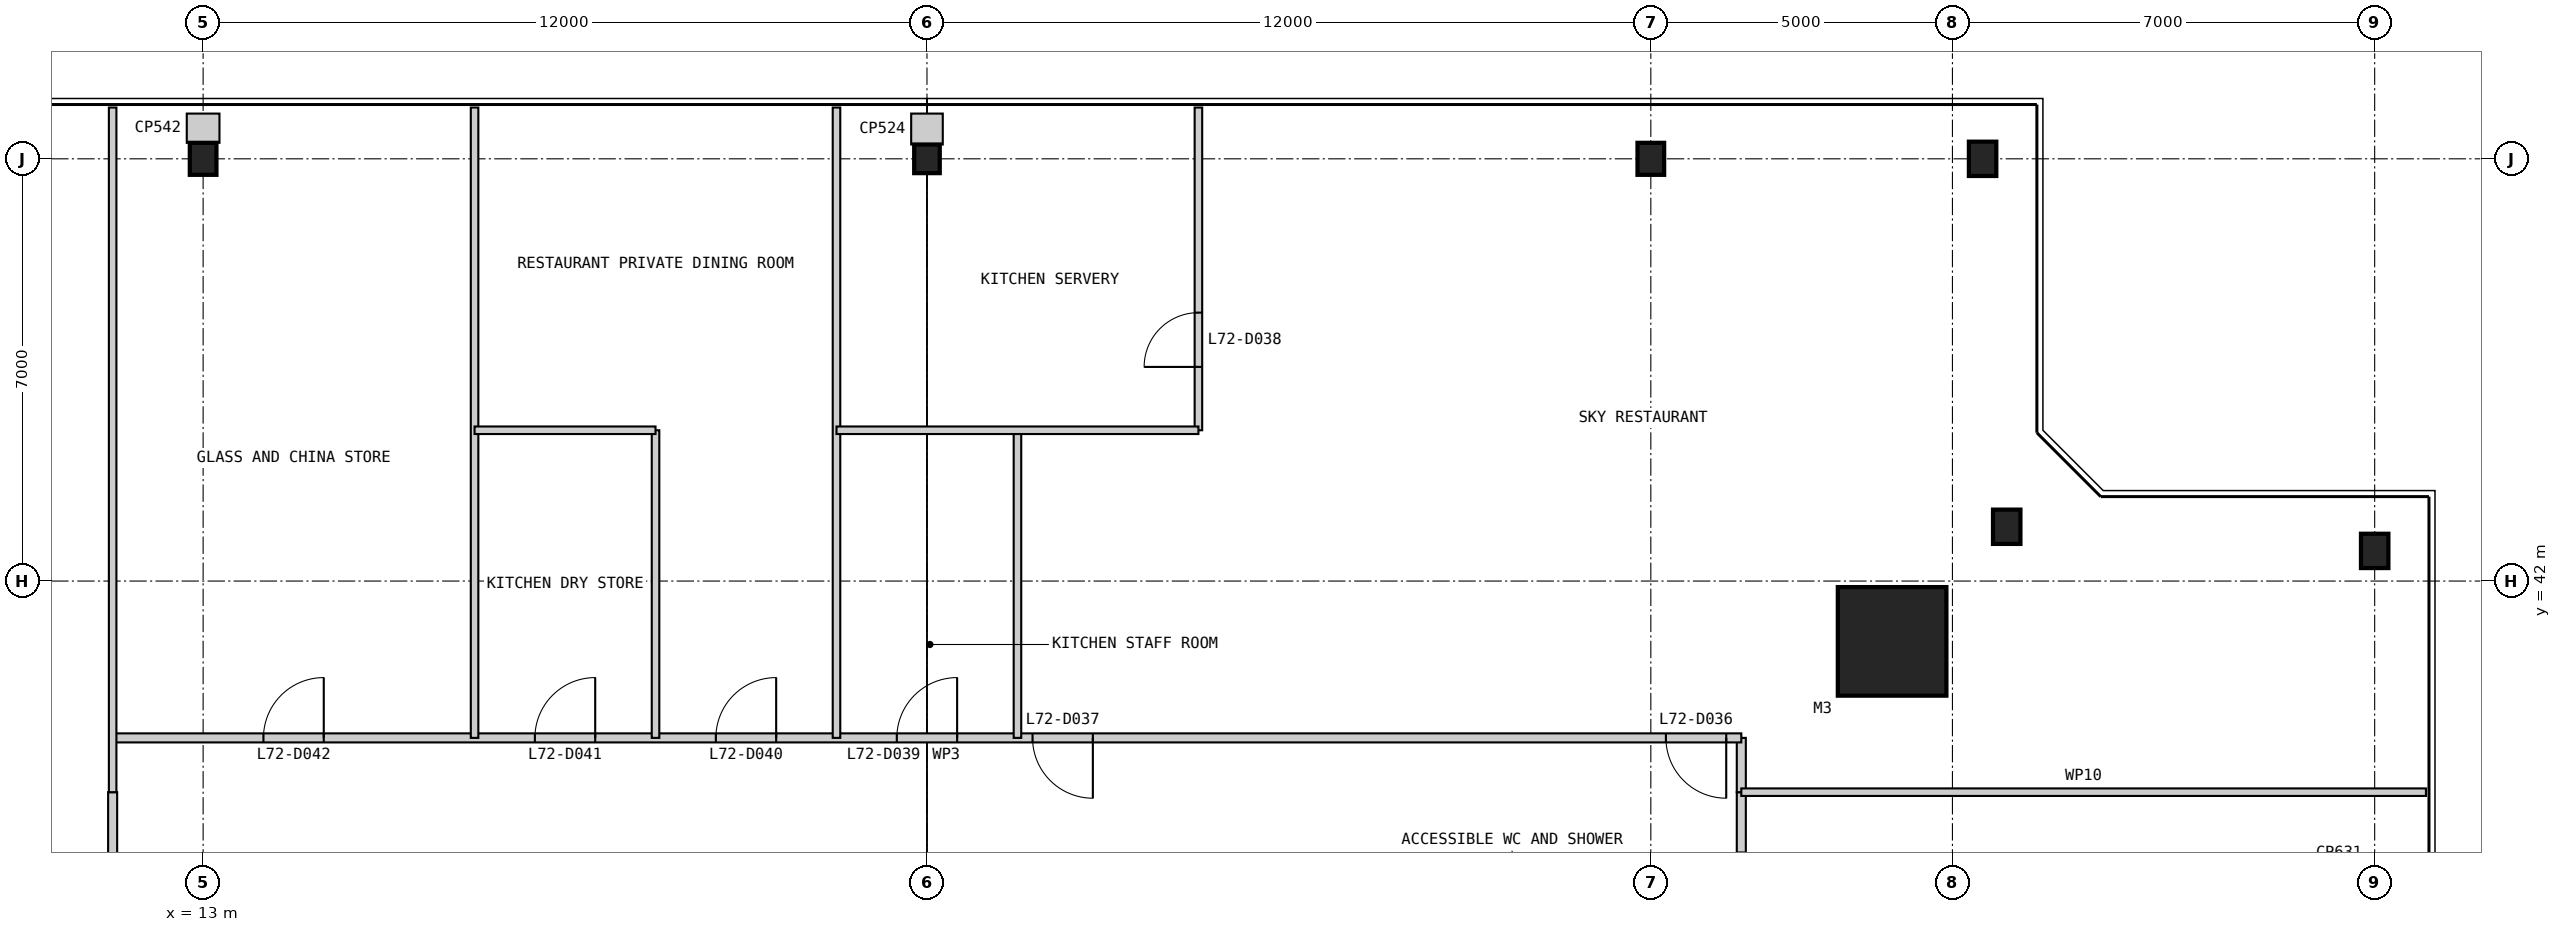
"""IFC4 building model, lengths in metres.
Left out: names, types, materials, properties, quantities, classifications, styles, units other than length and angle.
Written with IfcOpenShell. Run it as: python <this file> out.ifc"""

import sys

from ifc_helpers import new_model, si_unit, direction, frame, frame_2d, origin, origin_2d, place, context, subcontext, project, spatial, rectangle, i_section, extrude, element, fill, save


model = new_model("IFC4")
c1 = context("Model", 3, precision=1e-05, world=origin(), true_north=direction((0.0, 1.0)))
c2 = subcontext(c1, "Body", "Model", "MODEL_VIEW")
j1 = project(units=[si_unit("LENGTHUNIT", "METRE"), si_unit("PLANEANGLEUNIT", "RADIAN")], contexts=[c1])
p1 = place(None, origin())
s1 = spatial("IfcSite", under=j1, at=p1, CompositionType="ELEMENT")
p2 = place(p1, origin())
s2 = spatial("IfcBuilding", under=s1, at=p2, CompositionType="ELEMENT")
p3 = place(p2, frame((0.0, 0.0, 296.8)))
s3 = spatial("IfcBuildingStorey", under=s2, at=p3, CompositionType="ELEMENT", Elevation=296.8)
p4 = place(p3, frame((41.0, 41.0, 0.0), z_axis=(0.0, 0.0, 1.0), x_axis=(1.0, 0.0, 0.0)))
e1 = element("IfcColumn", 1, at=p4, inside=s3, PredefinedType="COLUMN", context=c2, shape_type="SweptSolid", body=[
    extrude(rectangle(XDim=1.8, YDim=1.8, at=origin_2d()), origin(), (0.0, 0.0, 1.0), 5.0),
])
for number, where, z_axis, x_axis in (
    (2, (49.0, 42.5, 0.0), (0.0, 0.0, 1.0), (1.0, 0.0, 0.0)),
    (3, (42.9, 42.9, 0.0), (0.0, 0.0, 1.0), (1.0, 0.0, 0.0)),
    (4, (42.5, 49.0, 0.0), (0.0, 0.0, 1.0), (1.0, 0.0, 0.0)),
):
    element("IfcColumn", number, at=place(p3, frame(where, z_axis=z_axis, x_axis=x_axis)), inside=s3, PredefinedType="COLUMN", context=c2, shape_type="SweptSolid", body=[
        extrude(i_section(OverallWidth=0.455, OverallDepth=0.569, WebThickness=0.078, FlangeThickness=0.125, at=origin_2d()), origin(), (0.0, 0.0, 1.0), 5.0),
    ])
p5 = place(p3, frame((37.0, 49.0, 0.0), z_axis=(0.0, 0.0, 1.0), x_axis=(1.0, 0.0, 0.0)))
e5 = element("IfcColumn", 5, at=p5, inside=s3, PredefinedType="COLUMN", context=c2, shape_type="SweptSolid", body=[
    extrude(i_section(OverallWidth=0.442, OverallDepth=0.531, WebThickness=0.066, FlangeThickness=0.106, at=origin_2d()), origin(), (0.0, 0.0, 1.0), 5.0),
])
p6 = place(p3, frame((25.0, 49.0, 0.0), z_axis=(0.0, 0.0, 1.0), x_axis=(1.0, 0.0, 0.0)))
e6 = element("IfcColumn", 6, at=p6, inside=s3, PredefinedType="COLUMN", context=c2, shape_type="SweptSolid", body=[
    extrude(i_section(OverallWidth=0.424, OverallDepth=0.475, WebThickness=0.048, FlangeThickness=0.077, at=origin_2d()), origin(), (0.0, 0.0, 1.0), 5.0),
])
p7 = place(p3, frame((13.0, 49.0, 0.0), z_axis=(0.0, 0.0, 1.0), x_axis=(1.0, 0.0, 0.0)))
e7 = element("IfcColumn", 7, at=p7, inside=s3, PredefinedType="COLUMN", context=c2, shape_type="SweptSolid", body=[
    extrude(i_section(OverallWidth=0.442, OverallDepth=0.531, WebThickness=0.066, FlangeThickness=0.106, at=origin_2d()), origin(), (0.0, 0.0, 1.0), 5.0),
])
p8 = place(p3, frame((38.5, 11.5, 0.0), z_axis=(0.0, 0.0, 1.0), x_axis=(0.0, 1.0, 0.0)))
e8 = element("IfcWall", 8, at=p8, inside=s3, PredefinedType="PARTITIONING", context=c2, shape_type="SweptSolid", body=[
    extrude(rectangle(XDim=27.0, YDim=0.15, at=frame_2d((13.5, 0.0))), origin(), (0.0, 0.0, 1.0), 4.8),
])
p9 = place(p8, frame((8.5, 0.0, 0.0)))
e9 = element("IfcOpeningElement", 9, at=p9, cuts=e8, PredefinedType="OPENING", context=c2, shape_type="SweptSolid", body=[
    extrude(rectangle(XDim=1.0, YDim=2.2, at=frame_2d((0.5, 1.1))), frame((0.0, 0.085, 0.0), z_axis=(0.0, -1.0, 0.0), x_axis=(1.0, 0.0, 0.0)), (0.0, 0.0, 1.0), 0.17),
])
p10 = place(p8, frame((25.0, 0.0, 0.0)))
e10 = element("IfcOpeningElement", 10, at=p10, cuts=e8, PredefinedType="OPENING", context=c2, shape_type="SweptSolid", body=[
    extrude(rectangle(XDim=1.0, YDim=2.2, at=frame_2d((0.5, 1.1))), frame((0.0, 0.085, 0.0), z_axis=(0.0, -1.0, 0.0), x_axis=(1.0, 0.0, 0.0)), (0.0, 0.0, 1.0), 0.17),
])
p11 = place(p8, frame((22.0, 0.0, 0.0)))
e11 = element("IfcOpeningElement", 11, at=p11, cuts=e8, PredefinedType="OPENING", context=c2, shape_type="SweptSolid", body=[
    extrude(rectangle(XDim=1.0, YDim=2.2, at=frame_2d((0.5, 1.1))), frame((0.0, 0.085, 0.0), z_axis=(0.0, -1.0, 0.0), x_axis=(1.0, 0.0, 0.0)), (0.0, 0.0, 1.0), 0.17),
])
p12 = place(p3, frame((38.5, 38.5, 0.0), z_axis=(0.0, 0.0, 1.0), x_axis=(0.0, 1.0, 0.0)))
e12 = element("IfcWall", 12, at=p12, inside=s3, PredefinedType="PARTITIONING", context=c2, shape_type="SweptSolid", body=[
    extrude(rectangle(XDim=0.9, YDim=0.15, at=frame_2d((0.45, 0.0))), origin(), (0.0, 0.0, 1.0), 4.8),
])
p13 = place(p3, frame((38.5, 39.4, 0.0), z_axis=(0.0, 0.0, 1.0), x_axis=(-1.0, 0.0, 0.0)))
e13 = element("IfcWall", 13, at=p13, inside=s3, PredefinedType="PARTITIONING", context=c2, shape_type="SweptSolid", body=[
    extrude(rectangle(XDim=27.0, YDim=0.15, at=frame_2d((13.5, 0.0))), origin(), (0.0, 0.0, 1.0), 4.8),
])
p14 = place(p13, frame((0.25, 0.0, 0.0)))
e14 = element("IfcOpeningElement", 14, at=p14, cuts=e13, PredefinedType="OPENING", context=c2, shape_type="SweptSolid", body=[
    extrude(rectangle(XDim=1.0, YDim=2.2, at=frame_2d((0.5, 1.1))), frame((0.0, 0.085, 0.0), z_axis=(0.0, -1.0, 0.0), x_axis=(1.0, 0.0, 0.0)), (0.0, 0.0, 1.0), 0.17),
])
p15 = place(p13, frame((10.75, 0.0, 0.0)))
e15 = element("IfcOpeningElement", 15, at=p15, cuts=e13, PredefinedType="OPENING", context=c2, shape_type="SweptSolid", body=[
    extrude(rectangle(XDim=1.0, YDim=2.2, at=frame_2d((0.5, 1.1))), frame((0.0, 0.085, 0.0), z_axis=(0.0, -1.0, 0.0), x_axis=(1.0, 0.0, 0.0)), (0.0, 0.0, 1.0), 0.17),
])
p16 = place(p13, frame((13.0, 0.0, 0.0)))
e16 = element("IfcOpeningElement", 16, at=p16, cuts=e13, PredefinedType="OPENING", context=c2, shape_type="SweptSolid", body=[
    extrude(rectangle(XDim=1.0, YDim=2.2, at=frame_2d((0.5, 1.1))), frame((0.0, 0.085, 0.0), z_axis=(0.0, -1.0, 0.0), x_axis=(1.0, 0.0, 0.0)), (0.0, 0.0, 1.0), 0.17),
])
p17 = place(p13, frame((16.0, 0.0, 0.0)))
e17 = element("IfcOpeningElement", 17, at=p17, cuts=e13, PredefinedType="OPENING", context=c2, shape_type="SweptSolid", body=[
    extrude(rectangle(XDim=1.0, YDim=2.2, at=frame_2d((0.5, 1.1))), frame((0.0, 0.085, 0.0), z_axis=(0.0, -1.0, 0.0), x_axis=(1.0, 0.0, 0.0)), (0.0, 0.0, 1.0), 0.17),
])
p18 = place(p13, frame((19.0, 0.0, 0.0)))
e18 = element("IfcOpeningElement", 18, at=p18, cuts=e13, PredefinedType="OPENING", context=c2, shape_type="SweptSolid", body=[
    extrude(rectangle(XDim=1.0, YDim=2.2, at=frame_2d((0.5, 1.1))), frame((0.0, 0.085, 0.0), z_axis=(0.0, -1.0, 0.0), x_axis=(1.0, 0.0, 0.0)), (0.0, 0.0, 1.0), 0.17),
])
p19 = place(p13, frame((23.5, 0.0, 0.0)))
e19 = element("IfcOpeningElement", 19, at=p19, cuts=e13, PredefinedType="OPENING", context=c2, shape_type="SweptSolid", body=[
    extrude(rectangle(XDim=1.0, YDim=2.2, at=frame_2d((0.5, 1.1))), frame((0.0, 0.085, 0.0), z_axis=(0.0, -1.0, 0.0), x_axis=(1.0, 0.0, 0.0)), (0.0, 0.0, 1.0), 0.17),
])
p20 = place(p3, frame((49.85, 38.5, 0.0), z_axis=(0.0, 0.0, 1.0), x_axis=(-1.0, 0.0, 0.0)))
e20 = element("IfcWall", 20, at=p20, inside=s3, PredefinedType="PARTITIONING", context=c2, shape_type="SweptSolid", body=[
    extrude(rectangle(XDim=11.35, YDim=0.125, at=frame_2d((5.675, 0.0))), origin(), (0.0, 0.0, 1.0), 4.8),
])
p21 = place(p3, frame((29.5, 49.85, 0.0), z_axis=(0.0, 0.0, 1.0), x_axis=(0.0, -1.0, 0.0)))
e21 = element("IfcWall", 21, at=p21, inside=s3, PredefinedType="PARTITIONING", context=c2, shape_type="SweptSolid", body=[
    extrude(rectangle(XDim=5.35, YDim=0.125, at=frame_2d((2.675, 0.0))), origin(), (0.0, 0.0, 1.0), 4.8),
])
p22 = place(p21, frame((3.4, 0.0, 0.0)))
e22 = element("IfcOpeningElement", 22, at=p22, cuts=e21, PredefinedType="OPENING", context=c2, shape_type="SweptSolid", body=[
    extrude(rectangle(XDim=0.9, YDim=2.2, at=frame_2d((0.45, 1.1))), frame((0.0, 0.073, 0.0), z_axis=(0.0, -1.0, 0.0), x_axis=(1.0, 0.0, 0.0)), (0.0, 0.0, 1.0), 0.145),
])
p23 = place(p3, frame((26.5, 44.5, 0.0), z_axis=(0.0, 0.0, 1.0), x_axis=(0.0, -1.0, 0.0)))
e23 = element("IfcWall", 23, at=p23, inside=s3, PredefinedType="PARTITIONING", context=c2, shape_type="SweptSolid", body=[
    extrude(rectangle(XDim=5.1, YDim=0.125, at=frame_2d((2.55, 0.0))), origin(), (0.0, 0.0, 1.0), 4.8),
])
p24 = place(p3, frame((23.5, 49.85, 0.0), z_axis=(0.0, 0.0, 1.0), x_axis=(0.0, -1.0, 0.0)))
e24 = element("IfcWall", 24, at=p24, inside=s3, PredefinedType="PARTITIONING", context=c2, shape_type="SweptSolid", body=[
    extrude(rectangle(XDim=10.45, YDim=0.125, at=frame_2d((5.225, 0.0))), origin(), (0.0, 0.0, 1.0), 4.8),
])
p25 = place(p3, frame((20.5, 44.5, 0.0), z_axis=(0.0, 0.0, 1.0), x_axis=(0.0, -1.0, 0.0)))
e25 = element("IfcWall", 25, at=p25, inside=s3, PredefinedType="PARTITIONING", context=c2, shape_type="SweptSolid", body=[
    extrude(rectangle(XDim=5.1, YDim=0.125, at=frame_2d((2.55, 0.0))), origin(), (0.0, 0.0, 1.0), 4.8),
])
p26 = place(p3, frame((17.5, 49.85, 0.0), z_axis=(0.0, 0.0, 1.0), x_axis=(0.0, -1.0, 0.0)))
e26 = element("IfcWall", 26, at=p26, inside=s3, PredefinedType="PARTITIONING", context=c2, shape_type="SweptSolid", body=[
    extrude(rectangle(XDim=10.45, YDim=0.125, at=frame_2d((5.225, 0.0))), origin(), (0.0, 0.0, 1.0), 4.8),
])
p27 = place(p3, frame((29.5, 44.5, 0.0), z_axis=(0.0, 0.0, 1.0), x_axis=(-1.0, 0.0, 0.0)))
e27 = element("IfcWall", 27, at=p27, inside=s3, PredefinedType="PARTITIONING", context=c2, shape_type="SweptSolid", body=[
    extrude(rectangle(XDim=6.0, YDim=0.125, at=frame_2d((3.0, 0.0))), origin(), (0.0, 0.0, 1.0), 4.8),
])
p28 = place(p3, frame((20.5, 44.5, 0.0), z_axis=(0.0, 0.0, 1.0), x_axis=(-1.0, 0.0, 0.0)))
e28 = element("IfcWall", 28, at=p28, inside=s3, PredefinedType="PARTITIONING", context=c2, shape_type="SweptSolid", body=[
    extrude(rectangle(XDim=3.0, YDim=0.125, at=frame_2d((1.5, 0.0))), origin(), (0.0, 0.0, 1.0), 4.8),
])
p29 = place(p3, frame((11.5, 38.5, 0.0), z_axis=(0.0, 0.0, 1.0), x_axis=(0.0, -1.0, 0.0)))
e29 = element("IfcWall", 29, at=p29, inside=s3, PredefinedType="PARTITIONING", context=c2, shape_type="SweptSolid", body=[
    extrude(rectangle(XDim=27.0, YDim=0.15, at=frame_2d((13.5, 0.0))), origin(), (0.0, 0.0, 1.0), 4.8),
])
p30 = place(p29, frame((5.5, 0.0, 0.0)))
e30 = element("IfcOpeningElement", 30, at=p30, cuts=e29, PredefinedType="OPENING", context=c2, shape_type="SweptSolid", body=[
    extrude(rectangle(XDim=1.0, YDim=2.2, at=frame_2d((0.5, 1.1))), frame((0.0, 0.085, 0.0), z_axis=(0.0, -1.0, 0.0), x_axis=(1.0, 0.0, 0.0)), (0.0, 0.0, 1.0), 0.17),
])
p31 = place(p29, frame((17.5, 0.0, 0.0)))
e31 = element("IfcOpeningElement", 31, at=p31, cuts=e29, PredefinedType="OPENING", context=c2, shape_type="SweptSolid", body=[
    extrude(rectangle(XDim=1.0, YDim=2.2, at=frame_2d((0.5, 1.1))), frame((0.0, 0.085, 0.0), z_axis=(0.0, -1.0, 0.0), x_axis=(1.0, 0.0, 0.0)), (0.0, 0.0, 1.0), 0.17),
])
p32 = place(p29, frame((23.5, 0.0, 0.0)))
e32 = element("IfcOpeningElement", 32, at=p32, cuts=e29, PredefinedType="OPENING", context=c2, shape_type="SweptSolid", body=[
    extrude(rectangle(XDim=1.0, YDim=2.2, at=frame_2d((0.5, 1.1))), frame((0.0, 0.085, 0.0), z_axis=(0.0, -1.0, 0.0), x_axis=(1.0, 0.0, 0.0)), (0.0, 0.0, 1.0), 0.17),
])
p33 = place(p3, frame((11.5, 49.85, 0.0), z_axis=(0.0, 0.0, 1.0), x_axis=(0.0, -1.0, 0.0)))
e33 = element("IfcWall", 33, at=p33, inside=s3, PredefinedType="PARTITIONING", context=c2, shape_type="SweptSolid", body=[
    extrude(rectangle(XDim=11.35, YDim=0.125, at=frame_2d((5.675, 0.0))), origin(), (0.0, 0.0, 1.0), 4.8),
])
p34 = place(p3, frame((25.0, 49.75, 0.0), z_axis=(0.0, 0.0, 1.0), x_axis=(0.0, -1.0, 0.0)))
e34 = element("IfcWall", 34, at=p34, inside=s3, PredefinedType="PARTITIONING", context=c2, shape_type="SweptSolid", body=[
    extrude(rectangle(XDim=0.512, YDim=0.524, at=frame_2d((0.256, 0.0))), origin(), (0.0, 0.0, 1.0), 4.8),
])
p35 = place(p3, frame((13.0, 49.75, 0.0), z_axis=(0.0, 0.0, 1.0), x_axis=(0.0, -1.0, 0.0)))
e35 = element("IfcWall", 35, at=p35, inside=s3, PredefinedType="PARTITIONING", context=c2, shape_type="SweptSolid", body=[
    extrude(rectangle(XDim=0.485, YDim=0.542, at=frame_2d((0.242, 0.0))), origin(), (0.0, 0.0, 1.0), 4.8),
])
p36 = place(p14, origin())
e36 = element("IfcDoor", 36, at=p36, inside=s3, OperationType="SINGLE_SWING_LEFT", PredefinedType="DOOR", context=c2, shape_type="SweptSolid", body=[
    extrude(rectangle(XDim=1.0, YDim=2.2, at=frame_2d((0.5, 1.1))), frame((0.0, 0.025, 0.0), z_axis=(0.0, -1.0, 0.0), x_axis=(1.0, 0.0, 0.0)), (0.0, 0.0, 1.0), 0.05),
])
fill(e14, e36)
p37 = place(p15, origin())
e37 = element("IfcDoor", 37, at=p37, inside=s3, OperationType="SINGLE_SWING_LEFT", PredefinedType="DOOR", context=c2, shape_type="SweptSolid", body=[
    extrude(rectangle(XDim=1.0, YDim=2.2, at=frame_2d((0.5, 1.1))), frame((0.0, 0.025, 0.0), z_axis=(0.0, -1.0, 0.0), x_axis=(1.0, 0.0, 0.0)), (0.0, 0.0, 1.0), 0.05),
])
fill(e15, e37)
p38 = place(p22, frame((0.9, 0.0, 0.0), z_axis=(0.0, 0.0, 1.0), x_axis=(-1.0, 0.0, 0.0)))
e38 = element("IfcDoor", 38, at=p38, inside=s3, OperationType="SINGLE_SWING_LEFT", PredefinedType="DOOR", context=c2, shape_type="SweptSolid", body=[
    extrude(rectangle(XDim=0.9, YDim=2.2, at=frame_2d((0.45, 1.1))), frame((0.0, 0.025, 0.0), z_axis=(0.0, -1.0, 0.0), x_axis=(1.0, 0.0, 0.0)), (0.0, 0.0, 1.0), 0.05),
])
fill(e22, e38)
p39 = place(p16, frame((1.0, 0.0, 0.0), z_axis=(0.0, 0.0, 1.0), x_axis=(-1.0, 0.0, 0.0)))
e39 = element("IfcDoor", 39, at=p39, inside=s3, OperationType="SINGLE_SWING_RIGHT", PredefinedType="DOOR", context=c2, shape_type="SweptSolid", body=[
    extrude(rectangle(XDim=1.0, YDim=2.2, at=frame_2d((0.5, 1.1))), frame((0.0, 0.025, 0.0), z_axis=(0.0, -1.0, 0.0), x_axis=(1.0, 0.0, 0.0)), (0.0, 0.0, 1.0), 0.05),
])
fill(e16, e39)
p40 = place(p17, frame((1.0, 0.0, 0.0), z_axis=(0.0, 0.0, 1.0), x_axis=(-1.0, 0.0, 0.0)))
e40 = element("IfcDoor", 40, at=p40, inside=s3, OperationType="SINGLE_SWING_RIGHT", PredefinedType="DOOR", context=c2, shape_type="SweptSolid", body=[
    extrude(rectangle(XDim=1.0, YDim=2.2, at=frame_2d((0.5, 1.1))), frame((0.0, 0.025, 0.0), z_axis=(0.0, -1.0, 0.0), x_axis=(1.0, 0.0, 0.0)), (0.0, 0.0, 1.0), 0.05),
])
fill(e17, e40)
p41 = place(p18, frame((1.0, 0.0, 0.0), z_axis=(0.0, 0.0, 1.0), x_axis=(-1.0, 0.0, 0.0)))
e41 = element("IfcDoor", 41, at=p41, inside=s3, OperationType="SINGLE_SWING_RIGHT", PredefinedType="DOOR", context=c2, shape_type="SweptSolid", body=[
    extrude(rectangle(XDim=1.0, YDim=2.2, at=frame_2d((0.5, 1.1))), frame((0.0, 0.025, 0.0), z_axis=(0.0, -1.0, 0.0), x_axis=(1.0, 0.0, 0.0)), (0.0, 0.0, 1.0), 0.05),
])
fill(e18, e41)
p42 = place(p19, frame((1.0, 0.0, 0.0), z_axis=(0.0, 0.0, 1.0), x_axis=(-1.0, 0.0, 0.0)))
e42 = element("IfcDoor", 42, at=p42, inside=s3, OperationType="SINGLE_SWING_RIGHT", PredefinedType="DOOR", context=c2, shape_type="SweptSolid", body=[
    extrude(rectangle(XDim=1.0, YDim=2.2, at=frame_2d((0.5, 1.1))), frame((0.0, 0.025, 0.0), z_axis=(0.0, -1.0, 0.0), x_axis=(1.0, 0.0, 0.0)), (0.0, 0.0, 1.0), 0.05),
])
fill(e19, e42)
save(model, sys.argv[1])
